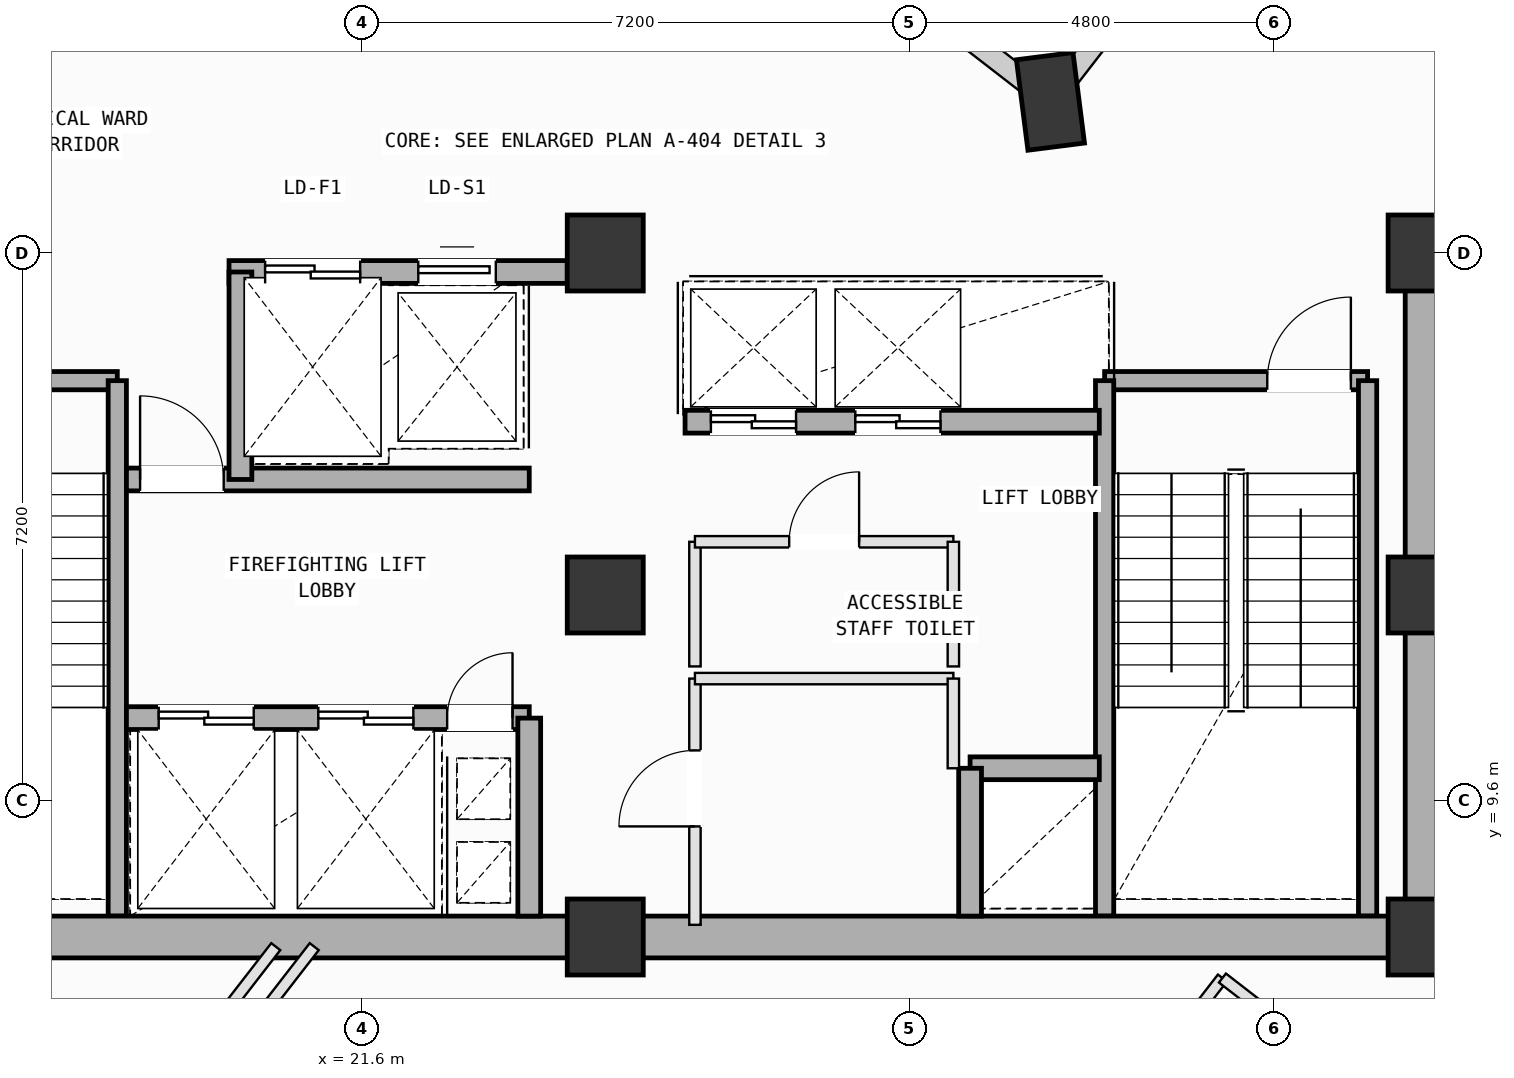
"""IFC4 building model, lengths in metres.
Left out: names, types, materials, properties, quantities, classifications, styles, units other than length and angle.
Written with IfcOpenShell. Run it as: python <this file> out.ifc"""

import sys

from ifc_helpers import new_model, si_unit, direction, frame, frame_2d, origin, origin_2d, place, context, subcontext, project, spatial, rectangle, extrude, element, fill, save


model = new_model("IFC4")
c1 = context("Model", 3, precision=1e-05, world=origin(), true_north=direction((0.0, 1.0)))
c2 = subcontext(c1, "Body", "Model", "MODEL_VIEW")
j1 = project(units=[si_unit("LENGTHUNIT", "METRE"), si_unit("PLANEANGLEUNIT", "RADIAN")], contexts=[c1])
p1 = place(None, origin())
s1 = spatial("IfcSite", under=j1, at=p1, CompositionType="ELEMENT")
p2 = place(p1, origin())
s2 = spatial("IfcBuilding", under=s1, at=p2, CompositionType="ELEMENT")
p3 = place(p2, frame((0.0, 0.0, 247.2)))
s3 = spatial("IfcBuildingStorey", under=s2, at=p3, CompositionType="ELEMENT", Elevation=247.2)
for number, where, z_axis, x_axis in (
    (1, (24.8, 7.8, 0.0), (0.0, 0.0, 1.0), (1.0, 0.0, 0.0)),
    (2, (24.8, 12.3, 0.0), (0.0, 0.0, 1.0), (1.0, 0.0, 0.0)),
    (3, (24.8, 16.8, 0.0), (0.0, 0.0, 1.0), (1.0, 0.0, 0.0)),
    (4, (35.6, 7.8, 0.0), (0.0, 0.0, 1.0), (1.0, 0.0, 0.0)),
    (5, (35.6, 12.3, 0.0), (0.0, 0.0, 1.0), (1.0, 0.0, 0.0)),
    (6, (35.6, 16.8, 0.0), (0.0, 0.0, 1.0), (1.0, 0.0, 0.0)),
):
    element("IfcColumn", number, at=place(p3, frame(where, z_axis=z_axis, x_axis=x_axis)), inside=s3, PredefinedType="COLUMN", context=c2, shape_type="SweptSolid", body=[
        extrude(rectangle(XDim=1.0, YDim=1.0, at=origin_2d()), origin(), (0.0, 0.0, 1.0), 4.0),
    ])
p4 = place(p3, frame((30.657, 18.794, 0.002), z_axis=(0.024976669224, -0.011969259579, 0.999616377827), x_axis=(-0.94878285786, 0.314731962752, 0.027475084218)))
e7 = element("IfcColumn", 7, at=p4, inside=s3, PredefinedType="COLUMN", context=c2, shape_type="SweptSolid", body=[
    extrude(rectangle(XDim=1.2, YDim=0.75, at=origin_2d()), origin(), (0.0, 0.0, 1.0), 3.998),
])
p5 = place(p3, frame((30.906, 19.115, 0.0), z_axis=(0.0, 0.0, 1.0), x_axis=(0.612215569716, 0.790690898011, 0.0)))
e8 = element("IfcWall", 8, at=p5, inside=s3, PredefinedType="SOLIDWALL", context=c2, shape_type="SweptSolid", body=[
    extrude(rectangle(XDim=6.158, YDim=0.28, at=frame_2d((3.079, 0.0))), origin(), (0.0, 0.0, 1.0), 3.265),
])
p6 = place(p3, frame((24.885, 23.264, 0.0), z_axis=(0.0, 0.0, 1.0), x_axis=(0.790684257093, -0.612224146523, 0.0)))
e9 = element("IfcWall", 9, at=p6, inside=s3, PredefinedType="SOLIDWALL", context=c2, shape_type="SweptSolid", body=[
    extrude(rectangle(XDim=6.958, YDim=0.28, at=frame_2d((3.479, 0.0))), origin(), (0.0, 0.0, 1.0), 3.165),
])
p7 = place(p3, frame((14.92, 15.12, 0.0), z_axis=(0.0, 0.0, 1.0), x_axis=(1.0, 0.0, 0.0)))
e10 = element("IfcWall", 10, at=p7, inside=s3, PredefinedType="SOLIDWALL", context=c2, shape_type="SweptSolid", body=[
    extrude(rectangle(XDim=3.46, YDim=0.24, at=frame_2d((1.73, 0.0))), origin(), (0.0, 0.0, 1.0), 3.78),
])
p8 = place(p7, frame((0.22, 0.0, 0.0)))
e11 = element("IfcOpeningElement", 11, at=p8, cuts=e10, PredefinedType="OPENING", context=c2, shape_type="SweptSolid", body=[
    extrude(rectangle(XDim=1.1, YDim=2.15, at=frame_2d((0.55, 1.075))), frame((0.0, 0.13, 0.0), z_axis=(0.0, -1.0, 0.0), x_axis=(1.0, 0.0, 0.0)), (0.0, 0.0, 1.0), 0.26),
])
p9 = place(p3, frame((18.38, 15.12, 0.0), z_axis=(0.0, 0.0, 1.0), x_axis=(0.0, -1.0, 0.0)))
e12 = element("IfcWall", 12, at=p9, inside=s3, PredefinedType="SOLIDWALL", context=c2, shape_type="SweptSolid", body=[
    extrude(rectangle(XDim=7.045, YDim=0.24, at=frame_2d((3.522, 0.0))), origin(), (0.0, 0.0, 1.0), 3.78),
])
p10 = place(p3, frame((31.37, 15.12, 0.0), z_axis=(0.0, 0.0, 1.0), x_axis=(1.0, 0.0, 0.0)))
e13 = element("IfcWall", 13, at=p10, inside=s3, PredefinedType="SOLIDWALL", context=c2, shape_type="SweptSolid", body=[
    extrude(rectangle(XDim=3.46, YDim=0.24, at=frame_2d((1.73, 0.0))), origin(), (0.0, 0.0, 1.0), 3.78),
])
p11 = place(p10, frame((2.14, 0.0, 0.0)))
e14 = element("IfcOpeningElement", 14, at=p11, cuts=e13, PredefinedType="OPENING", context=c2, shape_type="SweptSolid", body=[
    extrude(rectangle(XDim=1.1, YDim=2.15, at=frame_2d((0.55, 1.075))), frame((0.0, 0.13, 0.0), z_axis=(0.0, -1.0, 0.0), x_axis=(1.0, 0.0, 0.0)), (0.0, 0.0, 1.0), 0.26),
])
for number, where, z_axis, x_axis in (
    (15, (34.83, 15.12, 0.0), (0.0, 0.0, 1.0), (0.0, -1.0, 0.0)),
    (16, (31.37, 8.075, 0.0), (0.0, 0.0, 1.0), (0.0, 1.0, 0.0)),
):
    element("IfcWall", number, at=place(p3, frame(where, z_axis=z_axis, x_axis=x_axis)), inside=s3, PredefinedType="SOLIDWALL", context=c2, shape_type="SweptSolid", body=[
        extrude(rectangle(XDim=7.045, YDim=0.24, at=frame_2d((3.522, 0.0))), origin(), (0.0, 0.0, 1.0), 3.78),
    ])
for number, where, z_axis, x_axis in (
    (17, (14.0, 7.8, 0.0), (0.0, 0.0, 1.0), (1.0, 0.0, 0.0)),
    (18, (24.8, 7.8, 0.0), (0.0, 0.0, 1.0), (1.0, 0.0, 0.0)),
):
    element("IfcWall", number, at=place(p3, frame(where, z_axis=z_axis, x_axis=x_axis)), inside=s3, PredefinedType="SHEAR", context=c2, shape_type="SweptSolid", body=[
        extrude(rectangle(XDim=10.8, YDim=0.55, at=frame_2d((5.4, 0.0))), origin(), (0.0, 0.0, 1.0), 3.78),
    ])
p12 = place(p3, frame((35.6, 7.8, 0.0), z_axis=(0.0, 0.0, 1.0), x_axis=(0.0, 1.0, 0.0)))
e19 = element("IfcWall", 19, at=p12, inside=s3, PredefinedType="SHEAR", context=c2, shape_type="SweptSolid", body=[
    extrude(rectangle(XDim=9.0, YDim=0.55, at=frame_2d((4.5, 0.0))), origin(), (0.0, 0.0, 1.0), 3.78),
])
p13 = place(p3, frame((19.85, 16.55, 0.0), z_axis=(0.0, 0.0, 1.0), x_axis=(1.0, 0.0, 0.0)))
e20 = element("IfcWall", 20, at=p13, inside=s3, PredefinedType="SOLIDWALL", context=c2, shape_type="SweptSolid", body=[
    extrude(rectangle(XDim=4.45, YDim=0.3, at=frame_2d((2.225, 0.0))), origin(), (0.0, 0.0, 1.0), 3.78),
])
p14 = place(p13, frame((0.475, 0.0, 0.0)))
e21 = element("IfcOpeningElement", 21, at=p14, cuts=e20, PredefinedType="OPENING", context=c2, shape_type="SweptSolid", body=[
    extrude(rectangle(XDim=1.25, YDim=2.18, at=frame_2d((0.625, 1.09))), frame((0.0, 0.16, 0.0), z_axis=(0.0, -1.0, 0.0), x_axis=(1.0, 0.0, 0.0)), (0.0, 0.0, 1.0), 0.32),
])
p15 = place(p13, frame((2.49, 0.0, 0.0)))
e22 = element("IfcOpeningElement", 22, at=p15, cuts=e20, PredefinedType="OPENING", context=c2, shape_type="SweptSolid", body=[
    extrude(rectangle(XDim=1.02, YDim=2.12, at=frame_2d((0.51, 1.06))), frame((0.0, 0.16, 0.0), z_axis=(0.0, -1.0, 0.0), x_axis=(1.0, 0.0, 0.0)), (0.0, 0.0, 1.0), 0.32),
])
p16 = place(p3, frame((18.5, 10.68, 0.0), z_axis=(0.0, 0.0, 1.0), x_axis=(1.0, 0.0, 0.0)))
e23 = element("IfcWall", 23, at=p16, inside=s3, PredefinedType="SOLIDWALL", context=c2, shape_type="SweptSolid", body=[
    extrude(rectangle(XDim=5.3, YDim=0.3, at=frame_2d((2.65, 0.0))), origin(), (0.0, 0.0, 1.0), 3.78),
])
p17 = place(p16, frame((4.22, 0.0, 0.0)))
e24 = element("IfcOpeningElement", 24, at=p17, cuts=e23, PredefinedType="OPENING", context=c2, shape_type="SweptSolid", body=[
    extrude(rectangle(XDim=0.86, YDim=2.06, at=frame_2d((0.43, 1.03))), frame((0.0, 0.16, 0.0), z_axis=(0.0, -1.0, 0.0), x_axis=(1.0, 0.0, 0.0)), (0.0, 0.0, 1.0), 0.32),
])
p18 = place(p16, frame((0.425, 0.0, 0.0)))
e25 = element("IfcOpeningElement", 25, at=p18, cuts=e23, PredefinedType="OPENING", context=c2, shape_type="SweptSolid", body=[
    extrude(rectangle(XDim=1.25, YDim=2.18, at=frame_2d((0.625, 1.09))), frame((0.0, 0.16, 0.0), z_axis=(0.0, -1.0, 0.0), x_axis=(1.0, 0.0, 0.0)), (0.0, 0.0, 1.0), 0.32),
])
p19 = place(p16, frame((2.525, 0.0, 0.0)))
e26 = element("IfcOpeningElement", 26, at=p19, cuts=e23, PredefinedType="OPENING", context=c2, shape_type="SweptSolid", body=[
    extrude(rectangle(XDim=1.25, YDim=2.18, at=frame_2d((0.625, 1.09))), frame((0.0, 0.16, 0.0), z_axis=(0.0, -1.0, 0.0), x_axis=(1.0, 0.0, 0.0)), (0.0, 0.0, 1.0), 0.32),
])
p20 = place(p3, frame((18.5, 13.82, 0.0), z_axis=(0.0, 0.0, 1.0), x_axis=(1.0, 0.0, 0.0)))
e27 = element("IfcWall", 27, at=p20, inside=s3, PredefinedType="SOLIDWALL", context=c2, shape_type="SweptSolid", body=[
    extrude(rectangle(XDim=5.3, YDim=0.3, at=frame_2d((2.65, 0.0))), origin(), (0.0, 0.0, 1.0), 3.78),
])
p21 = place(p20, frame((0.18, 0.0, 0.0)))
e28 = element("IfcOpeningElement", 28, at=p21, cuts=e27, PredefinedType="OPENING", context=c2, shape_type="SweptSolid", body=[
    extrude(rectangle(XDim=1.1, YDim=2.15, at=frame_2d((0.55, 1.075))), frame((0.0, 0.16, 0.0), z_axis=(0.0, -1.0, 0.0), x_axis=(1.0, 0.0, 0.0)), (0.0, 0.0, 1.0), 0.32),
])
p22 = place(p3, frame((23.8, 8.075, 0.0), z_axis=(0.0, 0.0, 1.0), x_axis=(0.0, 1.0, 0.0)))
e29 = element("IfcWall", 29, at=p22, inside=s3, PredefinedType="SOLIDWALL", context=c2, shape_type="SweptSolid", body=[
    extrude(rectangle(XDim=2.605, YDim=0.3, at=frame_2d((1.302, 0.0))), origin(), (0.0, 0.0, 1.0), 3.78),
])
p23 = place(p3, frame((20.0, 13.82, 0.0), z_axis=(0.0, 0.0, 1.0), x_axis=(0.0, 1.0, 0.0)))
e30 = element("IfcWall", 30, at=p23, inside=s3, PredefinedType="SOLIDWALL", context=c2, shape_type="SweptSolid", body=[
    extrude(rectangle(XDim=2.73, YDim=0.3, at=frame_2d((1.365, 0.0))), origin(), (0.0, 0.0, 1.0), 3.78),
])
p24 = place(p3, frame((29.6, 10.02, 0.0), z_axis=(0.0, 0.0, 1.0), x_axis=(1.0, 0.0, 0.0)))
e31 = element("IfcWall", 31, at=p24, inside=s3, PredefinedType="SOLIDWALL", context=c2, shape_type="SweptSolid", body=[
    extrude(rectangle(XDim=1.7, YDim=0.3, at=frame_2d((0.85, 0.0))), origin(), (0.0, 0.0, 1.0), 3.78),
])
p25 = place(p3, frame((29.6, 8.075, 0.0), z_axis=(0.0, 0.0, 1.0), x_axis=(0.0, 1.0, 0.0)))
e32 = element("IfcWall", 32, at=p25, inside=s3, PredefinedType="SOLIDWALL", context=c2, shape_type="SweptSolid", body=[
    extrude(rectangle(XDim=1.945, YDim=0.3, at=frame_2d((0.973, 0.0))), origin(), (0.0, 0.0, 1.0), 3.78),
])
p26 = place(p3, frame((25.85, 14.58, 0.0), z_axis=(0.0, 0.0, 1.0), x_axis=(1.0, 0.0, 0.0)))
e33 = element("IfcWall", 33, at=p26, inside=s3, PredefinedType="SOLIDWALL", context=c2, shape_type="SweptSolid", body=[
    extrude(rectangle(XDim=5.45, YDim=0.3, at=frame_2d((2.725, 0.0))), origin(), (0.0, 0.0, 1.0), 3.78),
])
p27 = place(p26, frame((0.34, 0.0, 0.0)))
e34 = element("IfcOpeningElement", 34, at=p27, cuts=e33, PredefinedType="OPENING", context=c2, shape_type="SweptSolid", body=[
    extrude(rectangle(XDim=1.12, YDim=2.15, at=frame_2d((0.56, 1.075))), frame((0.0, 0.16, 0.0), z_axis=(0.0, -1.0, 0.0), x_axis=(1.0, 0.0, 0.0)), (0.0, 0.0, 1.0), 0.32),
])
p28 = place(p26, frame((2.24, 0.0, 0.0)))
e35 = element("IfcOpeningElement", 35, at=p28, cuts=e33, PredefinedType="OPENING", context=c2, shape_type="SweptSolid", body=[
    extrude(rectangle(XDim=1.12, YDim=2.15, at=frame_2d((0.56, 1.075))), frame((0.0, 0.16, 0.0), z_axis=(0.0, -1.0, 0.0), x_axis=(1.0, 0.0, 0.0)), (0.0, 0.0, 1.0), 0.32),
])
p29 = place(p3, frame((25.98, 7.96, 0.0), z_axis=(0.0, 0.0, 1.0), x_axis=(0.0, 1.0, 0.0)))
e36 = element("IfcWall", 36, at=p29, inside=s3, PredefinedType="PARTITIONING", context=c2, shape_type="SweptSolid", body=[
    extrude(rectangle(XDim=3.24, YDim=0.15, at=frame_2d((1.62, 0.0))), origin(), (0.0, 0.0, 1.0), 3.78),
])
p30 = place(p29, frame((1.295, 0.0, 0.0)))
e37 = element("IfcOpeningElement", 37, at=p30, cuts=e36, PredefinedType="OPENING", context=c2, shape_type="SweptSolid", body=[
    extrude(rectangle(XDim=1.0, YDim=2.12, at=frame_2d((0.5, 1.06))), frame((0.0, 0.085, 0.0), z_axis=(0.0, -1.0, 0.0), x_axis=(1.0, 0.0, 0.0)), (0.0, 0.0, 1.0), 0.17),
])
p31 = place(p3, frame((25.98, 11.2, 0.0), z_axis=(0.0, 0.0, 1.0), x_axis=(1.0, 0.0, 0.0)))
e38 = element("IfcWall", 38, at=p31, inside=s3, PredefinedType="PARTITIONING", context=c2, shape_type="SweptSolid", body=[
    extrude(rectangle(XDim=3.4, YDim=0.15, at=frame_2d((1.7, 0.0))), origin(), (0.0, 0.0, 1.0), 3.78),
])
p32 = place(p3, frame((29.38, 11.2, 0.0), z_axis=(0.0, 0.0, 1.0), x_axis=(0.0, -1.0, 0.0)))
e39 = element("IfcWall", 39, at=p32, inside=s3, PredefinedType="PARTITIONING", context=c2, shape_type="SweptSolid", body=[
    extrude(rectangle(XDim=1.18, YDim=0.15, at=frame_2d((0.59, 0.0))), origin(), (0.0, 0.0, 1.0), 3.78),
])
p33 = place(p3, frame((25.98, 11.36, 0.0), z_axis=(0.0, 0.0, 1.0), x_axis=(0.0, 1.0, 0.0)))
e40 = element("IfcWall", 40, at=p33, inside=s3, PredefinedType="PARTITIONING", context=c2, shape_type="SweptSolid", body=[
    extrude(rectangle(XDim=1.64, YDim=0.15, at=frame_2d((0.82, 0.0))), origin(), (0.0, 0.0, 1.0), 3.78),
])
p34 = place(p3, frame((25.98, 13.0, 0.0), z_axis=(0.0, 0.0, 1.0), x_axis=(1.0, 0.0, 0.0)))
e41 = element("IfcWall", 41, at=p34, inside=s3, PredefinedType="PARTITIONING", context=c2, shape_type="SweptSolid", body=[
    extrude(rectangle(XDim=3.4, YDim=0.15, at=frame_2d((1.7, 0.0))), origin(), (0.0, 0.0, 1.0), 3.78),
])
p35 = place(p34, frame((1.24, 0.0, 0.0)))
e42 = element("IfcOpeningElement", 42, at=p35, cuts=e41, PredefinedType="OPENING", context=c2, shape_type="SweptSolid", body=[
    extrude(rectangle(XDim=0.92, YDim=2.1, at=frame_2d((0.46, 1.05))), frame((0.0, 0.085, 0.0), z_axis=(0.0, -1.0, 0.0), x_axis=(1.0, 0.0, 0.0)), (0.0, 0.0, 1.0), 0.17),
])
p36 = place(p3, frame((29.38, 13.0, 0.0), z_axis=(0.0, 0.0, 1.0), x_axis=(0.0, -1.0, 0.0)))
e43 = element("IfcWall", 43, at=p36, inside=s3, PredefinedType="PARTITIONING", context=c2, shape_type="SweptSolid", body=[
    extrude(rectangle(XDim=1.64, YDim=0.15, at=frame_2d((0.82, 0.0))), origin(), (0.0, 0.0, 1.0), 3.78),
])
p37 = place(p3, frame((30.324, 3.908, 0.0), z_axis=(0.0, 0.0, 1.0), x_axis=(0.612292812762, 0.790631084287, 0.0)))
e44 = element("IfcWall", 44, at=p37, inside=s3, PredefinedType="PARTITIONING", context=c2, shape_type="SweptSolid", body=[
    extrude(rectangle(XDim=4.24, YDim=0.15, at=frame_2d((2.12, 0.0))), origin(), (0.0, 0.0, 1.0), 3.78),
])
p38 = place(p3, frame((32.92, 7.26, 0.0), z_axis=(0.0, 0.0, 1.0), x_axis=(0.790650233598, -0.612268085164, 0.0)))
e45 = element("IfcWall", 45, at=p38, inside=s3, PredefinedType="PARTITIONING", context=c2, shape_type="SweptSolid", body=[
    extrude(rectangle(XDim=11.935, YDim=0.15, at=frame_2d((5.967, 0.0))), origin(), (0.0, 0.0, 1.0), 3.78),
])
p39 = place(p38, frame((5.537, 0.0, 0.0)))
e46 = element("IfcOpeningElement", 46, at=p39, cuts=e45, PredefinedType="OPENING", context=c2, shape_type="SweptSolid", body=[
    extrude(rectangle(XDim=0.86, YDim=2.06, at=frame_2d((0.43, 1.03))), frame((0.0, 0.085, 0.0), z_axis=(0.0, -1.0, 0.0), x_axis=(1.0, 0.0, 0.0)), (0.0, 0.0, 1.0), 0.17),
])
p40 = place(p3, frame((35.6, 7.5, 0.0), z_axis=(0.0, 0.0, 1.0), x_axis=(1.0, 0.0, 0.0)))
e47 = element("IfcWall", 47, at=p40, inside=s3, PredefinedType="PARTITIONING", context=c2, shape_type="SweptSolid", body=[
    extrude(rectangle(XDim=0.55, YDim=0.15, at=frame_2d((0.275, 0.0))), origin(), (0.0, 0.0, 1.0), 3.78),
])
p41 = place(p3, frame((18.467, 4.438, 0.0), z_axis=(0.0, 0.0, 1.0), x_axis=(0.612067264166, 0.79080570568, 0.0)))
e48 = element("IfcWall", 48, at=p41, inside=s3, PredefinedType="PARTITIONING", context=c2, shape_type="SweptSolid", body=[
    extrude(rectangle(XDim=4.091, YDim=0.15, at=frame_2d((2.045, 0.0))), origin(), (0.0, 0.0, 1.0), 3.78),
])
p42 = place(p3, frame((20.465, 7.673, 0.0), z_axis=(0.0, 0.0, 1.0), x_axis=(-0.612173192991, -0.790723707614, 0.0)))
e49 = element("IfcWall", 49, at=p42, inside=s3, PredefinedType="PARTITIONING", context=c2, shape_type="SweptSolid", body=[
    extrude(rectangle(XDim=3.876, YDim=0.15, at=frame_2d((1.938, 0.0))), origin(), (0.0, 0.0, 1.0), 3.78),
])
p43 = place(p11, origin())
e50 = element("IfcDoor", 50, at=p43, inside=s3, OperationType="SINGLE_SWING_RIGHT", PredefinedType="DOOR", context=c2, shape_type="SweptSolid", body=[
    extrude(rectangle(XDim=1.1, YDim=2.15, at=frame_2d((0.55, 1.075))), frame((0.0, 0.025, 0.0), z_axis=(0.0, -1.0, 0.0), x_axis=(1.0, 0.0, 0.0)), (0.0, 0.0, 1.0), 0.05),
])
fill(e14, e50)
p44 = place(p17, origin())
e51 = element("IfcDoor", 51, at=p44, inside=s3, OperationType="SINGLE_SWING_RIGHT", PredefinedType="DOOR", context=c2, shape_type="SweptSolid", body=[
    extrude(rectangle(XDim=0.86, YDim=2.06, at=frame_2d((0.43, 1.03))), frame((0.0, 0.025, 0.0), z_axis=(0.0, -1.0, 0.0), x_axis=(1.0, 0.0, 0.0)), (0.0, 0.0, 1.0), 0.05),
])
fill(e24, e51)
p45 = place(p21, origin())
e52 = element("IfcDoor", 52, at=p45, inside=s3, OperationType="SINGLE_SWING_LEFT", PredefinedType="DOOR", context=c2, shape_type="SweptSolid", body=[
    extrude(rectangle(XDim=1.1, YDim=2.15, at=frame_2d((0.55, 1.075))), frame((0.0, 0.025, 0.0), z_axis=(0.0, -1.0, 0.0), x_axis=(1.0, 0.0, 0.0)), (0.0, 0.0, 1.0), 0.05),
])
fill(e28, e52)
p46 = place(p18, origin())
e53 = element("IfcDoor", 53, at=p46, inside=s3, OperationType="DOUBLE_DOOR_SLIDING", PredefinedType="DOOR", context=c2, shape_type="SweptSolid", body=[
    extrude(rectangle(XDim=1.25, YDim=2.18, at=frame_2d((0.625, 1.09))), frame((0.0, 0.025, 0.0), z_axis=(0.0, -1.0, 0.0), x_axis=(1.0, 0.0, 0.0)), (0.0, 0.0, 1.0), 0.05),
])
fill(e25, e53)
p47 = place(p19, origin())
e54 = element("IfcDoor", 54, at=p47, inside=s3, OperationType="DOUBLE_DOOR_SLIDING", PredefinedType="DOOR", context=c2, shape_type="SweptSolid", body=[
    extrude(rectangle(XDim=1.25, YDim=2.18, at=frame_2d((0.625, 1.09))), frame((0.0, 0.025, 0.0), z_axis=(0.0, -1.0, 0.0), x_axis=(1.0, 0.0, 0.0)), (0.0, 0.0, 1.0), 0.05),
])
fill(e26, e54)
p48 = place(p27, origin())
e55 = element("IfcDoor", 55, at=p48, inside=s3, OperationType="DOUBLE_DOOR_SLIDING", PredefinedType="DOOR", context=c2, shape_type="SweptSolid", body=[
    extrude(rectangle(XDim=1.12, YDim=2.15, at=frame_2d((0.56, 1.075))), frame((0.0, 0.025, 0.0), z_axis=(0.0, -1.0, 0.0), x_axis=(1.0, 0.0, 0.0)), (0.0, 0.0, 1.0), 0.05),
])
fill(e34, e55)
p49 = place(p28, origin())
e56 = element("IfcDoor", 56, at=p49, inside=s3, OperationType="DOUBLE_DOOR_SLIDING", PredefinedType="DOOR", context=c2, shape_type="SweptSolid", body=[
    extrude(rectangle(XDim=1.12, YDim=2.15, at=frame_2d((0.56, 1.075))), frame((0.0, 0.025, 0.0), z_axis=(0.0, -1.0, 0.0), x_axis=(1.0, 0.0, 0.0)), (0.0, 0.0, 1.0), 0.05),
])
fill(e35, e56)
p50 = place(p14, origin())
e57 = element("IfcDoor", 57, at=p50, inside=s3, OperationType="DOUBLE_DOOR_SLIDING", PredefinedType="DOOR", context=c2, shape_type="SweptSolid", body=[
    extrude(rectangle(XDim=1.25, YDim=2.18, at=frame_2d((0.625, 1.09))), frame((0.0, 0.025, 0.0), z_axis=(0.0, -1.0, 0.0), x_axis=(1.0, 0.0, 0.0)), (0.0, 0.0, 1.0), 0.05),
])
fill(e21, e57)
p51 = place(p15, origin())
e58 = element("IfcDoor", 58, at=p51, inside=s3, OperationType="SLIDING_TO_LEFT", PredefinedType="DOOR", context=c2, shape_type="SweptSolid", body=[
    extrude(rectangle(XDim=1.02, YDim=2.12, at=frame_2d((0.51, 1.06))), frame((0.0, 0.025, 0.0), z_axis=(0.0, -1.0, 0.0), x_axis=(1.0, 0.0, 0.0)), (0.0, 0.0, 1.0), 0.05),
])
fill(e22, e58)
p52 = place(p30, origin())
e59 = element("IfcDoor", 59, at=p52, inside=s3, OperationType="SINGLE_SWING_LEFT", PredefinedType="DOOR", context=c2, shape_type="SweptSolid", body=[
    extrude(rectangle(XDim=1.0, YDim=2.12, at=frame_2d((0.5, 1.06))), frame((0.0, 0.025, 0.0), z_axis=(0.0, -1.0, 0.0), x_axis=(1.0, 0.0, 0.0)), (0.0, 0.0, 1.0), 0.05),
])
fill(e37, e59)
p53 = place(p35, origin())
e60 = element("IfcDoor", 60, at=p53, inside=s3, OperationType="SINGLE_SWING_RIGHT", PredefinedType="DOOR", context=c2, shape_type="SweptSolid", body=[
    extrude(rectangle(XDim=0.92, YDim=2.1, at=frame_2d((0.46, 1.05))), frame((0.0, 0.025, 0.0), z_axis=(0.0, -1.0, 0.0), x_axis=(1.0, 0.0, 0.0)), (0.0, 0.0, 1.0), 0.05),
])
fill(e42, e60)
save(model, sys.argv[1])
